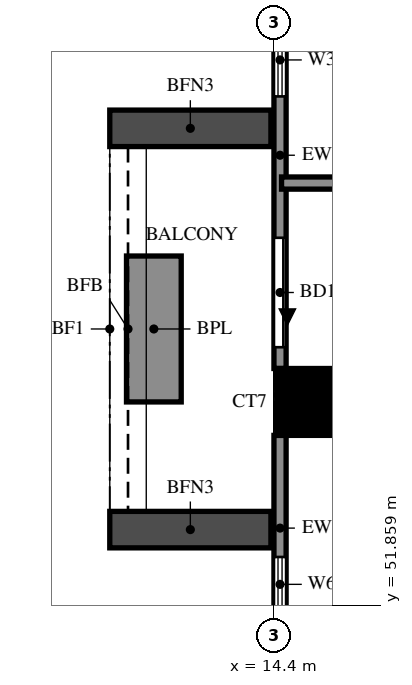
"""IFC4 building model, lengths in metres.
Left out: names, types, materials, properties, quantities, classifications, styles, units other than length and angle.
Written with IfcOpenShell. Run it as: python <this file> out.ifc"""

import sys

from ifc_helpers import new_model, si_unit, direction, frame, frame_2d, origin, origin_2d, place, context, subcontext, project, spatial, rectangle, extrude, source, transform, mapped, element, fill, save


model = new_model("IFC4")
c1 = context("Model", 3, precision=1e-05, world=origin(), true_north=direction((0.0, 1.0)))
c2 = subcontext(c1, "Body", "Model", "MODEL_VIEW")
j1 = project(units=[si_unit("LENGTHUNIT", "METRE"), si_unit("PLANEANGLEUNIT", "RADIAN")], contexts=[c1])
p1 = place(None, origin())
s1 = spatial("IfcSite", under=j1, at=p1, CompositionType="ELEMENT")
p2 = place(p1, origin())
s2 = spatial("IfcBuilding", under=s1, at=p2, CompositionType="ELEMENT")
p3 = place(p2, frame((0.0, 0.0, 51.5)))
s3 = spatial("IfcBuildingStorey", under=s2, at=p3, CompositionType="ELEMENT", Elevation=51.5)
m1 = source(origin(), c2, "Body", "SweptSolid", [
    extrude(rectangle(XDim=1.1, YDim=1.1, at=origin_2d()), origin(), (0.0, 0.0, 1.0), 3.18),
])
p4 = place(p3, frame((15.0, 55.2, 0.0), z_axis=(0.0, 0.0, 1.0), x_axis=(1.0, 0.0, 0.0)))
e1 = element("IfcColumn", 1, at=p4, inside=s3, PredefinedType="COLUMN", context=c2, shape_type="MappedRepresentation", body=[
    mapped(m1, transform((0.0, 0.0, 0.0))),
])
p5 = place(p3, frame((14.5, 61.85, 0.0), z_axis=(0.0, 0.0, 1.0), x_axis=(0.0, -1.0, 0.0)))
e2 = element("IfcWall", 2, at=p5, inside=s3, PredefinedType="SOLIDWALL", context=c2, shape_type="SweptSolid", body=[
    extrude(rectangle(XDim=6.1, YDim=0.2, at=frame_2d((3.05, 0.0))), origin(), (0.0, 0.0, 1.0), 3.18),
])
p6 = place(p5, frame((3.95, 0.0, 0.0)))
e3 = element("IfcOpeningElement", 3, at=p6, cuts=e2, PredefinedType="OPENING", context=c2, shape_type="SweptSolid", body=[
    extrude(rectangle(XDim=1.8, YDim=2.4, at=frame_2d((0.9, 1.2))), frame((0.0, 0.11, 0.0), z_axis=(0.0, -1.0, 0.0), x_axis=(1.0, 0.0, 0.0)), (0.0, 0.0, 1.0), 0.22),
])
p7 = place(p5, frame((0.425, 0.0, 0.6)))
e4 = element("IfcOpeningElement", 4, at=p7, cuts=e2, PredefinedType="OPENING", context=c2, shape_type="SweptSolid", body=[
    extrude(rectangle(XDim=1.2, YDim=2.4, at=frame_2d((0.6, 1.2))), frame((0.0, 0.11, 0.0), z_axis=(0.0, -1.0, 0.0), x_axis=(1.0, 0.0, 0.0)), (0.0, 0.0, 1.0), 0.22),
])
p8 = place(p3, frame((14.5, 54.65, 0.0), z_axis=(0.0, 0.0, 1.0), x_axis=(0.0, -1.0, 0.0)))
e5 = element("IfcWall", 5, at=p8, inside=s3, PredefinedType="SOLIDWALL", context=c2, shape_type="SweptSolid", body=[
    extrude(rectangle(XDim=6.1, YDim=0.2, at=frame_2d((3.05, 0.0))), origin(), (0.0, 0.0, 1.0), 3.18),
])
p9 = place(p8, frame((3.575, 0.0, 0.6)))
e6 = element("IfcOpeningElement", 6, at=p9, cuts=e5, PredefinedType="OPENING", context=c2, shape_type="SweptSolid", body=[
    extrude(rectangle(XDim=1.8, YDim=2.4, at=frame_2d((0.9, 1.2))), frame((0.0, 0.11, 0.0), z_axis=(0.0, -1.0, 0.0), x_axis=(1.0, 0.0, 0.0)), (0.0, 0.0, 1.0), 0.22),
])
p10 = place(p8, frame((2.0, 0.0, 1.5)))
e7 = element("IfcOpeningElement", 7, at=p10, cuts=e5, PredefinedType="OPENING", context=c2, shape_type="SweptSolid", body=[
    extrude(rectangle(XDim=0.9, YDim=0.9, at=frame_2d((0.45, 0.45))), frame((0.0, 0.11, 0.0), z_axis=(0.0, -1.0, 0.0), x_axis=(1.0, 0.0, 0.0)), (0.0, 0.0, 1.0), 0.22),
])
for number, where, z_axis, x_axis in (
    (8, (14.35, 59.7, 0.0), (0.0, 0.0, 1.0), (-1.0, 0.0, 0.0)),
    (9, (14.35, 53.1, 0.0), (0.0, 0.0, 1.0), (-1.0, 0.0, 0.0)),
):
    element("IfcWall", number, at=place(p3, frame(where, z_axis=z_axis, x_axis=x_axis)), inside=s3, PredefinedType="SOLIDWALL", context=c2, shape_type="SweptSolid", body=[
        extrude(rectangle(XDim=2.65, YDim=0.6, at=frame_2d((1.325, 0.0))), origin(), (0.0, 0.0, 1.0), 2.85),
    ])
p11 = place(p3, frame((12.425, 57.6, 0.0), z_axis=(0.0, 0.0, 1.0), x_axis=(0.0, -1.0, 0.0)))
e10 = element("IfcWall", 10, at=p11, inside=s3, PredefinedType="SOLIDWALL", context=c2, shape_type="SweptSolid", body=[
    extrude(rectangle(XDim=2.4, YDim=0.9, at=frame_2d((1.2, 0.0))), origin(), (0.0, 0.0, 1.0), 0.9),
])
p12 = place(p3, frame((14.525, 58.8, 0.0), z_axis=(0.0, 0.0, 1.0), x_axis=(1.0, 0.0, 0.0)))
e11 = element("IfcWall", 11, at=p12, inside=s3, PredefinedType="SOLIDWALL", context=c2, shape_type="SweptSolid", body=[
    extrude(rectangle(XDim=11.875, YDim=0.2, at=frame_2d((5.938, 0.0))), origin(), (0.0, 0.0, 1.0), 2.28),
])
p13 = place(p3, frame((14.525, 55.2, 0.0), z_axis=(0.0, 0.0, 1.0), x_axis=(1.0, 0.0, 0.0)))
e12 = element("IfcWall", 12, at=p13, inside=s3, PredefinedType="PARTITIONING", context=c2, shape_type="SweptSolid", body=[
    extrude(rectangle(XDim=7.075, YDim=0.12, at=frame_2d((3.538, 0.0))), origin(), (0.0, 0.0, 1.0), 3.18),
])
p14 = place(p6, origin())
e13 = element("IfcDoor", 13, at=p14, inside=s3, OperationType="DOUBLE_DOOR_SLIDING", PredefinedType="DOOR", context=c2, shape_type="SweptSolid", body=[
    extrude(rectangle(XDim=1.8, YDim=2.4, at=frame_2d((0.9, 1.2))), frame((0.0, 0.025, 0.0), z_axis=(0.0, -1.0, 0.0), x_axis=(1.0, 0.0, 0.0)), (0.0, 0.0, 1.0), 0.05),
])
fill(e3, e13)
p15 = place(p7, origin())
e14 = element("IfcWindow", 14, at=p15, inside=s3, PartitioningType="SINGLE_PANEL", PredefinedType="WINDOW", context=c2, shape_type="SweptSolid", body=[
    extrude(rectangle(XDim=1.2, YDim=2.4, at=frame_2d((0.6, 1.2))), frame((0.0, 0.03, 0.0), z_axis=(0.0, -1.0, 0.0), x_axis=(1.0, 0.0, 0.0)), (0.0, 0.0, 1.0), 0.06),
])
fill(e4, e14)
p16 = place(p10, origin())
e15 = element("IfcWindow", 15, at=p16, inside=s3, PartitioningType="SINGLE_PANEL", PredefinedType="WINDOW", context=c2, shape_type="SweptSolid", body=[
    extrude(rectangle(XDim=0.9, YDim=0.9, at=frame_2d((0.45, 0.45))), frame((0.0, 0.03, 0.0), z_axis=(0.0, -1.0, 0.0), x_axis=(1.0, 0.0, 0.0)), (0.0, 0.0, 1.0), 0.06),
])
fill(e7, e15)
save(model, sys.argv[1])
